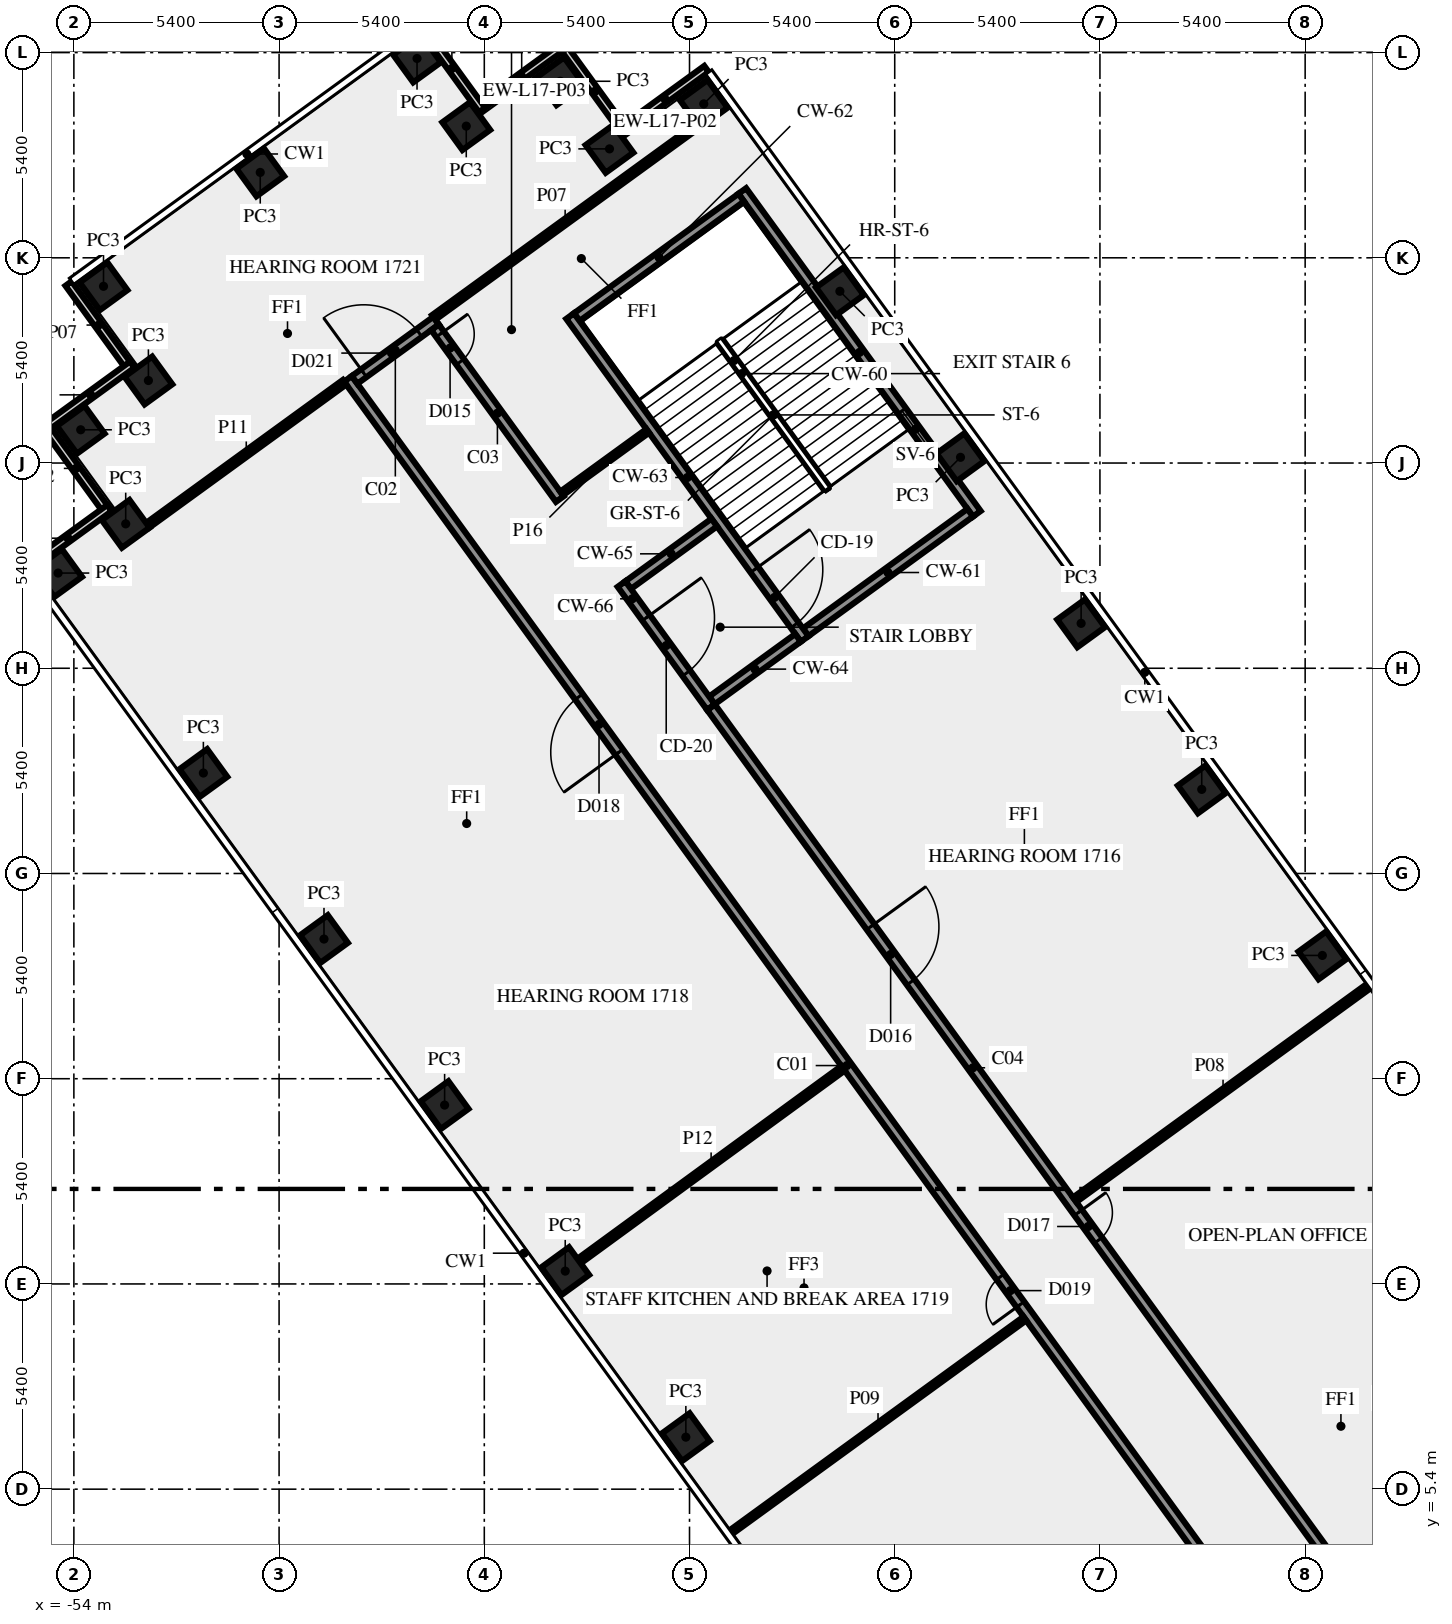
"""IFC4 building model, lengths in metres.
Left out: names, types, materials, properties, quantities, classifications, styles, units other than length and angle.
Written with IfcOpenShell. Run it as: python <this file> out.ifc"""

import sys

from ifc_helpers import new_model, si_unit, direction, frame, frame_2d, origin, origin_2d, place, context, subcontext, project, spatial, rectangle, extrude, element, fill, save


model = new_model("IFC4")
c1 = context("Model", 3, precision=1e-05, world=origin(), true_north=direction((0.0, 1.0)))
c2 = subcontext(c1, "Body", "Model", "MODEL_VIEW")
j1 = project(units=[si_unit("LENGTHUNIT", "METRE"), si_unit("PLANEANGLEUNIT", "RADIAN")], contexts=[c1])
p1 = place(None, origin())
s1 = spatial("IfcSite", under=j1, at=p1, CompositionType="ELEMENT")
p2 = place(p1, origin())
s2 = spatial("IfcBuilding", under=s1, at=p2, CompositionType="ELEMENT")
p3 = place(p2, frame((0.0, 0.0, 75.0)))
s3 = spatial("IfcBuildingStorey", under=s2, at=p3, CompositionType="ELEMENT", Elevation=75.0)
for number, where, z_axis, x_axis in (
    (1, (-21.147, 19.444, 0.0), (0.0, 0.0, 1.0), (-0.588, 0.809, 0.0)),
    (2, (-24.321, 23.812, 0.0), (0.0, 0.0, 1.0), (-0.588, 0.809, 0.0)),
    (3, (-27.495, 28.181, 0.0), (0.0, 0.0, 1.0), (-0.588, 0.809, 0.0)),
    (4, (-30.669, 32.55, 0.0), (0.0, 0.0, 1.0), (-0.588, 0.809, 0.0)),
    (5, (-33.843, 36.919, 0.0), (0.0, 0.0, 1.0), (-0.588, 0.809, 0.0)),
    (6, (-37.425, 41.85, 0.0), (0.0, 0.0, 1.0), (-0.588, 0.809, 0.0)),
    (7, (-39.906, 40.666, 0.0), (0.0, 0.0, 1.0), (-0.588, 0.809, 0.0)),
    (8, (-41.2, 42.445, 0.0), (0.0, 0.0, 1.0), (-0.588, 0.809, 0.0)),
    (9, (-43.675, 41.265, 0.0), (0.0, 0.0, 1.0), (-0.809, -0.588, 0.0)),
    (10, (-44.97, 43.045, 0.0), (0.0, 0.0, 1.0), (-0.809, -0.588, 0.0)),
    (11, (-49.096, 40.047, 0.0), (0.0, 0.0, 1.0), (-0.809, -0.588, 0.0)),
    (12, (-53.22, 37.05, 0.0), (0.0, 0.0, 1.0), (0.588, -0.809, 0.0)),
    (13, (-52.039, 34.571, 0.0), (0.0, 0.0, 1.0), (-0.809, -0.588, 0.0)),
    (14, (-53.82, 33.275, 0.0), (0.0, 0.0, 1.0), (0.588, -0.809, 0.0)),
    (15, (-52.636, 30.8, 0.0), (0.0, 0.0, 1.0), (-0.809, -0.588, 0.0)),
    (16, (-54.415, 29.505, 0.0), (0.0, 0.0, 1.0), (0.588, -0.809, 0.0)),
    (17, (-50.592, 24.243, 0.0), (0.0, 0.0, 1.0), (0.588, -0.809, 0.0)),
    (18, (-47.418, 19.875, 0.0), (0.0, 0.0, 1.0), (0.588, -0.809, 0.0)),
    (19, (-44.244, 15.506, 0.0), (0.0, 0.0, 1.0), (0.588, -0.809, 0.0)),
    (20, (-41.07, 11.137, 0.0), (0.0, 0.0, 1.0), (0.588, -0.809, 0.0)),
    (21, (-37.896, 6.769, 0.0), (0.0, 0.0, 1.0), (0.588, -0.809, 0.0)),
):
    element("IfcColumn", number, at=place(p3, frame(where, z_axis=z_axis, x_axis=x_axis)), inside=s3, PredefinedType="COLUMN", context=c2, shape_type="SweptSolid", body=[
        extrude(rectangle(XDim=0.9, YDim=0.9, at=origin_2d()), origin(), (0.0, 0.0, 1.0), 3.4),
    ])
p4 = place(p3, frame((-37.353, 42.768, 0.0), z_axis=(0.0, 0.0, 1.0), x_axis=(-0.809033161865, -0.587762999008, 0.0)))
e22 = element("IfcWall", 22, at=p4, inside=s3, PredefinedType="SOLIDWALL", context=c2, shape_type="SweptSolid", body=[
    extrude(rectangle(XDim=2.7, YDim=0.2, at=frame_2d((1.35, 0.0))), origin(), (0.0, 0.0, 1.0), 3.4),
])
p5 = place(p3, frame((-39.488, 41.094, 0.0), z_axis=(0.0, 0.0, 1.0), x_axis=(-0.587806000234, 0.809001919707, 0.0)))
e23 = element("IfcWall", 23, at=p5, inside=s3, PredefinedType="SOLIDWALL", context=c2, shape_type="SweptSolid", body=[
    extrude(rectangle(XDim=2.7, YDim=0.2, at=frame_2d((1.35, 0.0))), origin(), (0.0, 0.0, 1.0), 3.4),
])
for number, where, z_axis, x_axis in (
    (24, (-41.124, 43.366, 0.0), (0.0, 0.0, 1.0), (-0.809, -0.588, 0.0)),
    (25, (-43.259, 41.691, 0.0), (0.0, 0.0, 1.0), (-0.588, 0.809, 0.0)),
    (26, (-54.14, 37.123, 0.0), (0.0, 0.0, 1.0), (0.588, -0.809, 0.0)),
    (27, (-52.465, 34.987, 0.0), (0.0, 0.0, 1.0), (-0.809, -0.588, 0.0)),
):
    element("IfcWall", number, at=place(p3, frame(where, z_axis=z_axis, x_axis=x_axis)), inside=s3, PredefinedType="SOLIDWALL", context=c2, shape_type="SweptSolid", body=[
        extrude(rectangle(XDim=2.7, YDim=0.2, at=frame_2d((1.35, 0.0))), origin(), (0.0, 0.0, 1.0), 3.4),
    ])
p6 = place(p3, frame((-54.738, 33.351, 0.0), z_axis=(0.0, 0.0, 1.0), x_axis=(0.587779184282, -0.809021403008, 0.0)))
e28 = element("IfcWall", 28, at=p6, inside=s3, PredefinedType="SOLIDWALL", context=c2, shape_type="SweptSolid", body=[
    extrude(rectangle(XDim=2.7, YDim=0.2, at=frame_2d((1.35, 0.0))), origin(), (0.0, 0.0, 1.0), 3.4),
])
p7 = place(p3, frame((-53.063, 31.216, 0.0), z_axis=(0.0, 0.0, 1.0), x_axis=(-0.809033161865, -0.587762999008, 0.0)))
e29 = element("IfcWall", 29, at=p7, inside=s3, PredefinedType="SOLIDWALL", context=c2, shape_type="SweptSolid", body=[
    extrude(rectangle(XDim=2.7, YDim=0.2, at=frame_2d((1.35, 0.0))), origin(), (0.0, 0.0, 1.0), 3.4),
])
p8 = place(p3, frame((-30.24, 31.064, 0.0), z_axis=(0.0, 0.0, 1.0), x_axis=(-0.587795589702, 0.809009483706, 0.0)))
e30 = element("IfcWall", 30, at=p8, inside=s3, PredefinedType="SHEAR", context=c2, shape_type="SweptSolid", body=[
    extrude(rectangle(XDim=10.5, YDim=0.25, at=frame_2d((5.25, 0.0))), origin(), (0.0, 0.0, 1.0), 3.4),
])
p9 = place(p8, frame((2.15, 0.0, 1.0)))
e31 = element("IfcOpeningElement", 31, at=p9, cuts=e30, PredefinedType="OPENING", context=c2, shape_type="SweptSolid", body=[
    extrude(rectangle(XDim=1.2, YDim=1.2, at=frame_2d((0.6, 0.6))), frame((0.0, 0.135, 0.0), z_axis=(0.0, -1.0, 0.0), x_axis=(1.0, 0.0, 0.0)), (0.0, 0.0, 1.0), 0.27),
])
p10 = place(p3, frame((-30.414, 31.092, 0.0), z_axis=(0.0, 0.0, 1.0), x_axis=(-0.8089984606, -0.587810760999, 0.0)))
e32 = element("IfcWall", 32, at=p10, inside=s3, PredefinedType="SHEAR", context=c2, shape_type="SweptSolid", body=[
    extrude(rectangle(XDim=5.35, YDim=0.25, at=frame_2d((2.675, 0.0))), origin(), (0.0, 0.0, 1.0), 3.4),
])
p11 = place(p3, frame((-36.439, 39.384, 0.0), z_axis=(0.0, 0.0, 1.0), x_axis=(-0.809020161303, -0.587780893365, 0.0)))
e33 = element("IfcWall", 33, at=p11, inside=s3, PredefinedType="SHEAR", context=c2, shape_type="SweptSolid", body=[
    extrude(rectangle(XDim=5.35, YDim=0.25, at=frame_2d((2.675, 0.0))), origin(), (0.0, 0.0, 1.0), 3.4),
])
p12 = place(p3, frame((-40.942, 36.267, 0.0), z_axis=(0.0, 0.0, 1.0), x_axis=(0.587795589702, -0.809009483706, 0.0)))
e34 = element("IfcWall", 34, at=p12, inside=s3, PredefinedType="SHEAR", context=c2, shape_type="SweptSolid", body=[
    extrude(rectangle(XDim=10.5, YDim=0.25, at=frame_2d((5.25, 0.0))), origin(), (0.0, 0.0, 1.0), 3.4),
])
p13 = place(p12, frame((8.25, 0.0, 0.0)))
e35 = element("IfcOpeningElement", 35, at=p13, cuts=e34, PredefinedType="OPENING", context=c2, shape_type="SweptSolid", body=[
    extrude(rectangle(XDim=1.8, YDim=2.1, at=frame_2d((0.9, 1.05))), frame((0.0, 0.135, 0.0), z_axis=(0.0, -1.0, 0.0), x_axis=(1.0, 0.0, 0.0)), (0.0, 0.0, 1.0), 0.27),
])
for number, where, z_axis, x_axis in (
    (36, (-34.945, 27.8, 0.0), (0.0, 0.0, 1.0), (-0.809, -0.588, 0.0)),
    (37, (-37.149, 30.834, 0.0), (0.0, 0.0, 1.0), (-0.809, -0.588, 0.0)),
):
    element("IfcWall", number, at=place(p3, frame(where, z_axis=z_axis, x_axis=x_axis)), inside=s3, PredefinedType="SHEAR", context=c2, shape_type="SweptSolid", body=[
        extrude(rectangle(XDim=2.8, YDim=0.25, at=frame_2d((1.4, 0.0))), origin(), (0.0, 0.0, 1.0), 3.4),
    ])
p14 = place(p3, frame((-39.589, 29.216, 0.0), z_axis=(0.0, 0.0, 1.0), x_axis=(0.587772420479, -0.809026317077, 0.0)))
e38 = element("IfcWall", 38, at=p14, inside=s3, PredefinedType="SHEAR", context=c2, shape_type="SweptSolid", body=[
    extrude(rectangle(XDim=4.0, YDim=0.25, at=frame_2d((2.0, 0.0))), origin(), (0.0, 0.0, 1.0), 3.4),
])
p15 = place(p14, frame((1.1, 0.0, 0.0)))
e39 = element("IfcOpeningElement", 39, at=p15, cuts=e38, PredefinedType="OPENING", context=c2, shape_type="SweptSolid", body=[
    extrude(rectangle(XDim=1.8, YDim=2.1, at=frame_2d((0.9, 1.05))), frame((0.0, 0.135, 0.0), z_axis=(0.0, -1.0, 0.0), x_axis=(1.0, 0.0, 0.0)), (0.0, 0.0, 1.0), 0.27),
])
p16 = place(p3, frame((-20.531, -1.523, 0.0), z_axis=(0.0, 0.0, 1.0), x_axis=(-0.587784593204, 0.809017473231, 0.0)))
e40 = element("IfcWall", 40, at=p16, inside=s3, PredefinedType="SOLIDWALL", context=c2, shape_type="SweptSolid", body=[
    extrude(rectangle(XDim=44.67, YDim=0.25, at=frame_2d((22.335, 0.0))), origin(), (0.0, 0.0, 1.0), 3.4),
])
p17 = place(p16, frame((0.533, 0.0, 0.0)))
e41 = element("IfcOpeningElement", 41, at=p17, cuts=e40, PredefinedType="OPENING", context=c2, shape_type="SweptSolid", body=[
    extrude(rectangle(XDim=0.9, YDim=2.1, at=frame_2d((0.45, 1.05))), frame((0.0, 0.135, 0.0), z_axis=(0.0, -1.0, 0.0), x_axis=(1.0, 0.0, 0.0)), (0.0, 0.0, 1.0), 0.27),
])
p18 = place(p16, frame((32.531, 0.0, 0.0)))
e42 = element("IfcOpeningElement", 42, at=p18, cuts=e40, PredefinedType="OPENING", context=c2, shape_type="SweptSolid", body=[
    extrude(rectangle(XDim=1.8, YDim=2.1, at=frame_2d((0.9, 1.05))), frame((0.0, 0.135, 0.0), z_axis=(0.0, -1.0, 0.0), x_axis=(1.0, 0.0, 0.0)), (0.0, 0.0, 1.0), 0.27),
])
p19 = place(p16, frame((14.566, 0.0, 0.0)))
e43 = element("IfcOpeningElement", 43, at=p19, cuts=e40, PredefinedType="OPENING", context=c2, shape_type="SweptSolid", body=[
    extrude(rectangle(XDim=0.9, YDim=2.1, at=frame_2d((0.45, 1.05))), frame((0.0, 0.135, 0.0), z_axis=(0.0, -1.0, 0.0), x_axis=(1.0, 0.0, 0.0)), (0.0, 0.0, 1.0), 0.27),
])
p20 = place(p3, frame((-46.613, 34.588, 0.0), z_axis=(0.0, 0.0, 1.0), x_axis=(0.808994936898, 0.587815610607, 0.0)))
e44 = element("IfcWall", 44, at=p20, inside=s3, PredefinedType="SOLIDWALL", context=c2, shape_type="SweptSolid", body=[
    extrude(rectangle(XDim=2.65, YDim=0.25, at=frame_2d((1.325, 0.0))), origin(), (0.0, 0.0, 1.0), 3.4),
])
p21 = place(p20, frame((0.299, 0.0, 0.0)))
e45 = element("IfcOpeningElement", 45, at=p21, cuts=e44, PredefinedType="OPENING", context=c2, shape_type="SweptSolid", body=[
    extrude(rectangle(XDim=1.8, YDim=2.1, at=frame_2d((0.9, 1.05))), frame((0.0, 0.135, 0.0), z_axis=(0.0, -1.0, 0.0), x_axis=(1.0, 0.0, 0.0)), (0.0, 0.0, 1.0), 0.27),
])
p22 = place(p3, frame((-44.497, 35.971, 0.0), z_axis=(0.0, 0.0, 1.0), x_axis=(0.587742866856, -0.809047787501, 0.0)))
e46 = element("IfcWall", 46, at=p22, inside=s3, PredefinedType="SOLIDWALL", context=c2, shape_type="SweptSolid", body=[
    extrude(rectangle(XDim=5.586, YDim=0.25, at=frame_2d((2.793, 0.0))), origin(), (0.0, 0.0, 1.0), 3.4),
])
p23 = place(p22, frame((0.224, 0.0, 0.0)))
e47 = element("IfcOpeningElement", 47, at=p23, cuts=e46, PredefinedType="OPENING", context=c2, shape_type="SweptSolid", body=[
    extrude(rectangle(XDim=0.9, YDim=2.1, at=frame_2d((0.45, 1.05))), frame((0.0, 0.135, 0.0), z_axis=(0.0, -1.0, 0.0), x_axis=(1.0, 0.0, 0.0)), (0.0, 0.0, 1.0), 0.27),
])
p24 = place(p3, frame((-37.232, 25.972, 0.0), z_axis=(0.0, 0.0, 1.0), x_axis=(0.587786323093, -0.809016216391, 0.0)))
e48 = element("IfcWall", 48, at=p24, inside=s3, PredefinedType="SOLIDWALL", context=c2, shape_type="SweptSolid", body=[
    extrude(rectangle(XDim=33.493, YDim=0.25, at=frame_2d((16.747, 0.0))), origin(), (0.0, 0.0, 1.0), 3.4),
])
p25 = place(p24, frame((16.435, 0.0, 0.0)))
e49 = element("IfcOpeningElement", 49, at=p25, cuts=e48, PredefinedType="OPENING", context=c2, shape_type="SweptSolid", body=[
    extrude(rectangle(XDim=0.9, YDim=2.1, at=frame_2d((0.45, 1.05))), frame((0.0, 0.135, 0.0), z_axis=(0.0, -1.0, 0.0), x_axis=(1.0, 0.0, 0.0)), (0.0, 0.0, 1.0), 0.27),
])
p26 = place(p24, frame((7.137, 0.0, 0.0)))
e50 = element("IfcOpeningElement", 50, at=p26, cuts=e48, PredefinedType="OPENING", context=c2, shape_type="SweptSolid", body=[
    extrude(rectangle(XDim=1.8, YDim=2.1, at=frame_2d((0.9, 1.05))), frame((0.0, 0.135, 0.0), z_axis=(0.0, -1.0, 0.0), x_axis=(1.0, 0.0, 0.0)), (0.0, 0.0, 1.0), 0.27),
])
p27 = place(p3, frame((-37.614, 41.257, 0.0), z_axis=(0.0, 0.0, 1.0), x_axis=(-0.808991595707, -0.587820208972, 0.0)))
e51 = element("IfcWall", 51, at=p27, inside=s3, PredefinedType="PARTITIONING", context=c2, shape_type="SweptSolid", body=[
    extrude(rectangle(XDim=8.551, YDim=0.15, at=frame_2d((4.275, 0.0))), origin(), (0.0, 0.0, 1.0), 3.4),
])
p28 = place(p3, frame((-19.857, 18.689, 0.0), z_axis=(0.0, 0.0, 1.0), x_axis=(-0.809002920164, -0.587804623294, 0.0)))
e52 = element("IfcWall", 52, at=p28, inside=s3, PredefinedType="PARTITIONING", context=c2, shape_type="SweptSolid", body=[
    extrude(rectangle(XDim=9.651, YDim=0.15, at=frame_2d((4.825, 0.0))), origin(), (0.0, 0.0, 1.0), 2.5),
])
p29 = place(p3, frame((-28.976, 9.888, 0.0), z_axis=(0.0, 0.0, 1.0), x_axis=(-0.808998008689, -0.58781138296, 0.0)))
e53 = element("IfcWall", 53, at=p29, inside=s3, PredefinedType="PARTITIONING", context=c2, shape_type="SweptSolid", body=[
    extrude(rectangle(XDim=9.55, YDim=0.12, at=frame_2d((4.775, 0.0))), origin(), (0.0, 0.0, 1.0), 2.5),
])
p30 = place(p3, frame((-46.877, 34.526, 0.0), z_axis=(0.0, 0.0, 1.0), x_axis=(-0.808993566199, -0.587817497059, 0.0)))
e54 = element("IfcWall", 54, at=p30, inside=s3, PredefinedType="PARTITIONING", context=c2, shape_type="SweptSolid", body=[
    extrude(rectangle(XDim=6.395, YDim=0.15, at=frame_2d((3.197, 0.0))), origin(), (0.0, 0.0, 1.0), 3.4),
])
p31 = place(p3, frame((-40.702, 11.405, 0.0), z_axis=(0.0, 0.0, 1.0), x_axis=(0.807600812808, 0.58972953729, 0.0)))
e55 = element("IfcWall", 55, at=p31, inside=s3, PredefinedType="PARTITIONING", context=c2, shape_type="SweptSolid", body=[
    extrude(rectangle(XDim=8.595, YDim=0.15, at=frame_2d((4.297, 0.0))), origin(), (0.0, 0.0, 1.0), 3.4),
])
p32 = place(p3, frame((-41.166, 31.599, 0.0), z_axis=(0.0, 0.0, 1.0), x_axis=(0.809090262332, 0.587684394381, 0.0)))
e56 = element("IfcWall", 56, at=p32, inside=s3, PredefinedType="PARTITIONING", context=c2, shape_type="SweptSolid", body=[
    extrude(rectangle(XDim=2.801, YDim=0.12, at=frame_2d((1.4, 0.0))), origin(), (0.0, 0.0, 1.0), 3.4),
])
p33 = place(p9, origin())
e57 = element("IfcWindow", 57, at=p33, inside=s3, PartitioningType="SINGLE_PANEL", PredefinedType="WINDOW", context=c2, shape_type="SweptSolid", body=[
    extrude(rectangle(XDim=1.2, YDim=1.2, at=frame_2d((0.6, 0.6))), frame((0.0, 0.03, 0.0), z_axis=(0.0, -1.0, 0.0), x_axis=(1.0, 0.0, 0.0)), (0.0, 0.0, 1.0), 0.06),
])
fill(e31, e57)
p34 = place(p13, origin())
e58 = element("IfcDoor", 58, at=p34, inside=s3, OperationType="DOUBLE_DOOR_SINGLE_SWING", PredefinedType="DOOR", context=c2, shape_type="SweptSolid", body=[
    extrude(rectangle(XDim=1.8, YDim=2.1, at=frame_2d((0.9, 1.05))), frame((0.0, 0.025, 0.0), z_axis=(0.0, -1.0, 0.0), x_axis=(1.0, 0.0, 0.0)), (0.0, 0.0, 1.0), 0.05),
])
fill(e35, e58)
p35 = place(p15, origin())
e59 = element("IfcDoor", 59, at=p35, inside=s3, OperationType="DOUBLE_DOOR_SINGLE_SWING", PredefinedType="DOOR", context=c2, shape_type="SweptSolid", body=[
    extrude(rectangle(XDim=1.8, YDim=2.1, at=frame_2d((0.9, 1.05))), frame((0.0, 0.025, 0.0), z_axis=(0.0, -1.0, 0.0), x_axis=(1.0, 0.0, 0.0)), (0.0, 0.0, 1.0), 0.05),
])
fill(e39, e59)
p36 = place(p23, origin())
e60 = element("IfcDoor", 60, at=p36, inside=s3, OperationType="SINGLE_SWING_LEFT", PredefinedType="DOOR", context=c2, shape_type="SweptSolid", body=[
    extrude(rectangle(XDim=0.9, YDim=2.1, at=frame_2d((0.45, 1.05))), frame((0.0, 0.025, 0.0), z_axis=(0.0, -1.0, 0.0), x_axis=(1.0, 0.0, 0.0)), (0.0, 0.0, 1.0), 0.05),
])
fill(e47, e60)
p37 = place(p25, origin())
e61 = element("IfcDoor", 61, at=p37, inside=s3, OperationType="SINGLE_SWING_LEFT", PredefinedType="DOOR", context=c2, shape_type="SweptSolid", body=[
    extrude(rectangle(XDim=0.9, YDim=2.1, at=frame_2d((0.45, 1.05))), frame((0.0, 0.025, 0.0), z_axis=(0.0, -1.0, 0.0), x_axis=(1.0, 0.0, 0.0)), (0.0, 0.0, 1.0), 0.05),
])
fill(e49, e61)
p38 = place(p26, origin())
e62 = element("IfcDoor", 62, at=p38, inside=s3, OperationType="DOUBLE_DOOR_SINGLE_SWING", PredefinedType="DOOR", context=c2, shape_type="SweptSolid", body=[
    extrude(rectangle(XDim=1.8, YDim=2.1, at=frame_2d((0.9, 1.05))), frame((0.0, 0.025, 0.0), z_axis=(0.0, -1.0, 0.0), x_axis=(1.0, 0.0, 0.0)), (0.0, 0.0, 1.0), 0.05),
])
fill(e50, e62)
p39 = place(p18, origin())
e63 = element("IfcDoor", 63, at=p39, inside=s3, OperationType="DOUBLE_DOOR_SINGLE_SWING", PredefinedType="DOOR", context=c2, shape_type="SweptSolid", body=[
    extrude(rectangle(XDim=1.8, YDim=2.1, at=frame_2d((0.9, 1.05))), frame((0.0, 0.025, 0.0), z_axis=(0.0, -1.0, 0.0), x_axis=(1.0, 0.0, 0.0)), (0.0, 0.0, 1.0), 0.05),
])
fill(e42, e63)
p40 = place(p21, origin())
e64 = element("IfcDoor", 64, at=p40, inside=s3, OperationType="DOUBLE_DOOR_SINGLE_SWING", PredefinedType="DOOR", context=c2, shape_type="SweptSolid", body=[
    extrude(rectangle(XDim=1.8, YDim=2.1, at=frame_2d((0.9, 1.05))), frame((0.0, 0.025, 0.0), z_axis=(0.0, -1.0, 0.0), x_axis=(1.0, 0.0, 0.0)), (0.0, 0.0, 1.0), 0.05),
])
fill(e45, e64)
p41 = place(p19, origin())
e65 = element("IfcDoor", 65, at=p41, inside=s3, OperationType="SINGLE_SWING_LEFT", PredefinedType="DOOR", context=c2, shape_type="SweptSolid", body=[
    extrude(rectangle(XDim=0.9, YDim=2.1, at=frame_2d((0.45, 1.05))), frame((0.0, 0.025, 0.0), z_axis=(0.0, -1.0, 0.0), x_axis=(1.0, 0.0, 0.0)), (0.0, 0.0, 1.0), 0.05),
])
fill(e43, e65)
save(model, sys.argv[1])
